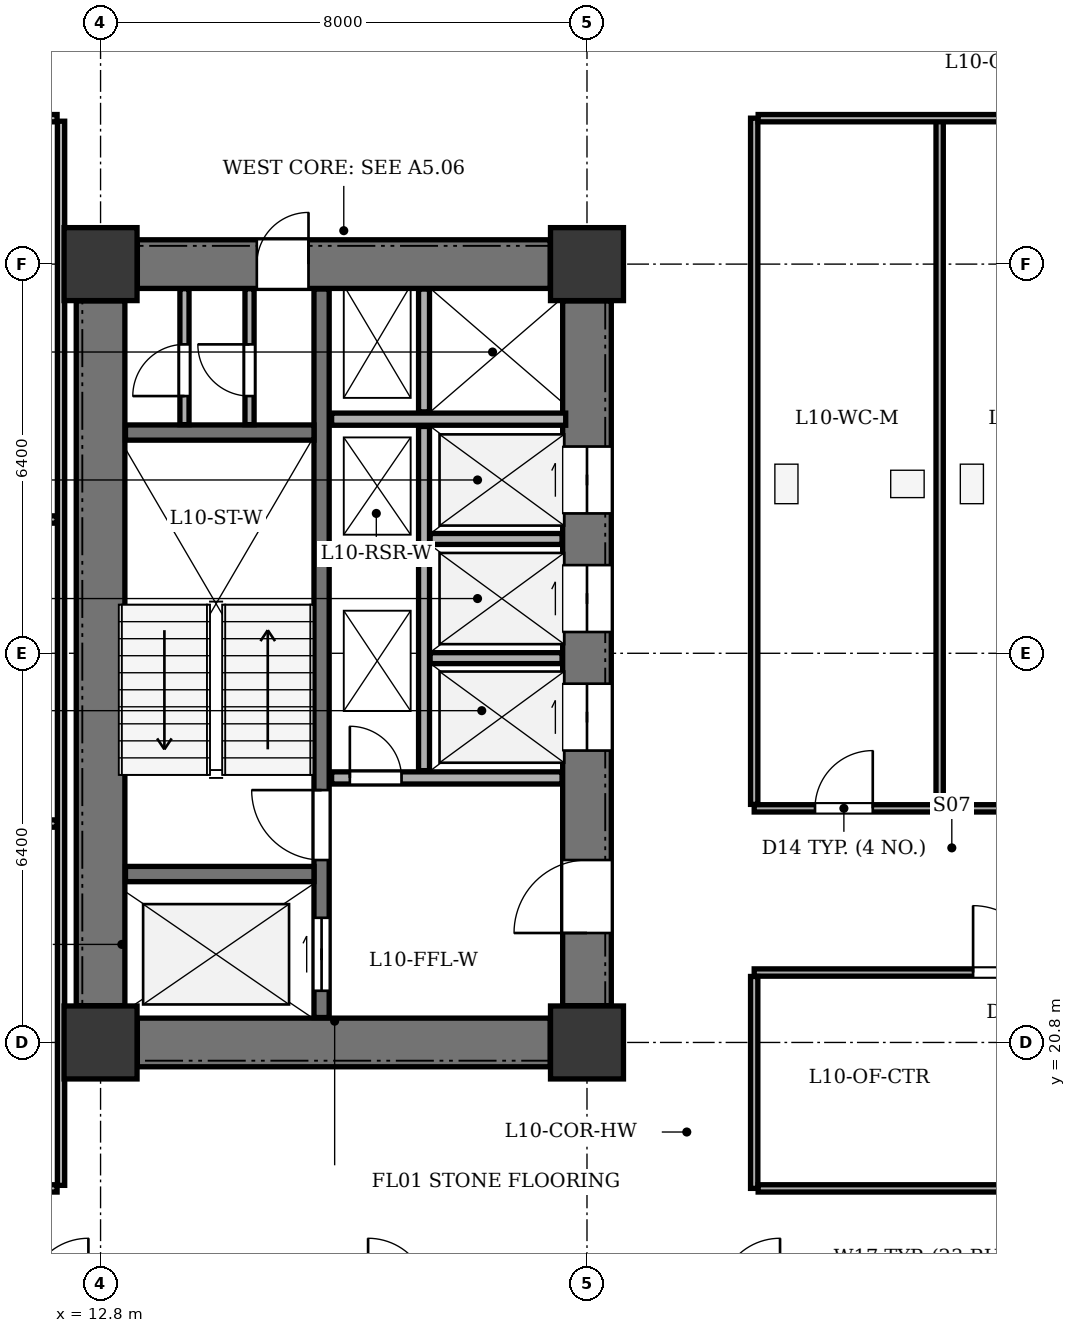
"""IFC4 building model, lengths in metres.
Left out: names, types, materials, properties, quantities, classifications, styles, units other than length and angle.
Written with IfcOpenShell. Run it as: python <this file> out.ifc"""

import sys

from ifc_helpers import new_model, si_unit, direction, frame, frame_2d, origin, origin_2d, place, context, subcontext, project, spatial, rectangle, extrude, element, fill, save


model = new_model("IFC4")
c1 = context("Model", 3, precision=1e-05, world=origin(), true_north=direction((0.0, 1.0)))
c2 = subcontext(c1, "Body", "Model", "MODEL_VIEW")
j1 = project(units=[si_unit("LENGTHUNIT", "METRE"), si_unit("PLANEANGLEUNIT", "RADIAN")], contexts=[c1])
p1 = place(None, origin())
s1 = spatial("IfcSite", under=j1, at=p1, CompositionType="ELEMENT")
p2 = place(p1, origin())
s2 = spatial("IfcBuilding", under=s1, at=p2, CompositionType="ELEMENT")
p3 = place(p2, frame((0.0, 0.0, 43.8)))
s3 = spatial("IfcBuildingStorey", under=s2, at=p3, CompositionType="ELEMENT", Elevation=43.8)
for number, where, z_axis, x_axis in (
    (1, (12.8, 20.8, 0.0), (0.0, 0.0, 1.0), (1.0, 0.0, 0.0)),
    (2, (20.8, 20.8, 0.0), (0.0, 0.0, 1.0), (1.0, 0.0, 0.0)),
    (3, (12.8, 33.6, 0.0), (0.0, 0.0, 1.0), (1.0, 0.0, 0.0)),
    (4, (20.8, 33.6, 0.0), (0.0, 0.0, 1.0), (1.0, 0.0, 0.0)),
):
    element("IfcColumn", number, at=place(p3, frame(where, z_axis=z_axis, x_axis=x_axis)), inside=s3, PredefinedType="COLUMN", context=c2, shape_type="SweptSolid", body=[
        extrude(rectangle(XDim=1.2, YDim=1.2, at=origin_2d()), origin(), (0.0, 0.0, 1.0), 3.9),
    ])
p4 = place(p3, frame((12.8, 21.405, 0.0), z_axis=(0.0, 0.0, 1.0), x_axis=(0.0, 1.0, 0.0)))
e5 = element("IfcWall", 5, at=p4, inside=s3, PredefinedType="SHEAR", context=c2, shape_type="SweptSolid", body=[
    extrude(rectangle(XDim=11.59, YDim=0.8, at=frame_2d((5.795, 0.0))), origin(), (0.0, 0.0, 1.0), 3.45),
])
p5 = place(p3, frame((13.405, 20.8, 0.0), z_axis=(0.0, 0.0, 1.0), x_axis=(1.0, 0.0, 0.0)))
e6 = element("IfcWall", 6, at=p5, inside=s3, PredefinedType="SHEAR", context=c2, shape_type="SweptSolid", body=[
    extrude(rectangle(XDim=6.79, YDim=0.8, at=frame_2d((3.395, 0.0))), origin(), (0.0, 0.0, 1.0), 3.45),
])
p6 = place(p3, frame((13.405, 33.6, 0.0), z_axis=(0.0, 0.0, 1.0), x_axis=(1.0, 0.0, 0.0)))
e7 = element("IfcWall", 7, at=p6, inside=s3, PredefinedType="SHEAR", context=c2, shape_type="SweptSolid", body=[
    extrude(rectangle(XDim=6.79, YDim=0.8, at=frame_2d((3.395, 0.0))), origin(), (0.0, 0.0, 1.0), 3.45),
])
p7 = place(p6, frame((1.965, 0.0, 0.0)))
e8 = element("IfcOpeningElement", 8, at=p7, cuts=e7, PredefinedType="OPENING", context=c2, shape_type="SweptSolid", body=[
    extrude(rectangle(XDim=0.85, YDim=2.02, at=frame_2d((0.425, 1.01))), frame((0.0, 0.41, 0.0), z_axis=(0.0, -1.0, 0.0), x_axis=(1.0, 0.0, 0.0)), (0.0, 0.0, 1.0), 0.82),
])
p8 = place(p3, frame((20.8, 21.405, 0.0), z_axis=(0.0, 0.0, 1.0), x_axis=(0.0, 1.0, 0.0)))
e9 = element("IfcWall", 9, at=p8, inside=s3, PredefinedType="SHEAR", context=c2, shape_type="SweptSolid", body=[
    extrude(rectangle(XDim=11.59, YDim=0.8, at=frame_2d((5.795, 0.0))), origin(), (0.0, 0.0, 1.0), 3.45),
])
p9 = place(p8, frame((1.195, 0.0, 0.0)))
e10 = element("IfcOpeningElement", 10, at=p9, cuts=e9, PredefinedType="OPENING", context=c2, shape_type="SweptSolid", body=[
    extrude(rectangle(XDim=1.2, YDim=2.15, at=frame_2d((0.6, 1.075))), frame((0.0, 0.41, 0.0), z_axis=(0.0, -1.0, 0.0), x_axis=(1.0, 0.0, 0.0)), (0.0, 0.0, 1.0), 0.82),
])
p10 = place(p8, frame((4.195, 0.0, 0.0)))
e11 = element("IfcOpeningElement", 11, at=p10, cuts=e9, PredefinedType="OPENING", context=c2, shape_type="SweptSolid", body=[
    extrude(rectangle(XDim=1.1, YDim=2.1, at=frame_2d((0.55, 1.05))), frame((0.0, 0.41, 0.0), z_axis=(0.0, -1.0, 0.0), x_axis=(1.0, 0.0, 0.0)), (0.0, 0.0, 1.0), 0.82),
])
p11 = place(p8, frame((6.145, 0.0, 0.0)))
e12 = element("IfcOpeningElement", 12, at=p11, cuts=e9, PredefinedType="OPENING", context=c2, shape_type="SweptSolid", body=[
    extrude(rectangle(XDim=1.1, YDim=2.1, at=frame_2d((0.55, 1.05))), frame((0.0, 0.41, 0.0), z_axis=(0.0, -1.0, 0.0), x_axis=(1.0, 0.0, 0.0)), (0.0, 0.0, 1.0), 0.82),
])
p12 = place(p8, frame((8.095, 0.0, 0.0)))
e13 = element("IfcOpeningElement", 13, at=p12, cuts=e9, PredefinedType="OPENING", context=c2, shape_type="SweptSolid", body=[
    extrude(rectangle(XDim=1.1, YDim=2.1, at=frame_2d((0.55, 1.05))), frame((0.0, 0.41, 0.0), z_axis=(0.0, -1.0, 0.0), x_axis=(1.0, 0.0, 0.0)), (0.0, 0.0, 1.0), 0.82),
])
p13 = place(p3, frame((16.435, 21.21, 0.0), z_axis=(0.0, 0.0, 1.0), x_axis=(0.0, 1.0, 0.0)))
e14 = element("IfcWall", 14, at=p13, inside=s3, PredefinedType="SHEAR", context=c2, shape_type="SweptSolid", body=[
    extrude(rectangle(XDim=11.98, YDim=0.25, at=frame_2d((5.99, 0.0))), origin(), (0.0, 0.0, 1.0), 3.45),
])
p14 = place(p13, frame((0.44, 0.0, 0.0)))
e15 = element("IfcOpeningElement", 15, at=p14, cuts=e14, PredefinedType="OPENING", context=c2, shape_type="SweptSolid", body=[
    extrude(rectangle(XDim=1.2, YDim=2.15, at=frame_2d((0.6, 1.075))), frame((0.0, 0.135, 0.0), z_axis=(0.0, -1.0, 0.0), x_axis=(1.0, 0.0, 0.0)), (0.0, 0.0, 1.0), 0.27),
])
p15 = place(p13, frame((2.59, 0.0, 0.0)))
e16 = element("IfcOpeningElement", 16, at=p15, cuts=e14, PredefinedType="OPENING", context=c2, shape_type="SweptSolid", body=[
    extrude(rectangle(XDim=1.15, YDim=2.15, at=frame_2d((0.575, 1.075))), frame((0.0, 0.135, 0.0), z_axis=(0.0, -1.0, 0.0), x_axis=(1.0, 0.0, 0.0)), (0.0, 0.0, 1.0), 0.27),
])
for number, where, z_axis, x_axis in (
    (17, (13.21, 23.57, 0.0), (0.0, 0.0, 1.0), (1.0, 0.0, 0.0)),
    (18, (13.21, 30.83, 0.0), (0.0, 0.0, 1.0), (1.0, 0.0, 0.0)),
):
    element("IfcWall", number, at=place(p3, frame(where, z_axis=z_axis, x_axis=x_axis)), inside=s3, PredefinedType="SHEAR", context=c2, shape_type="SweptSolid", body=[
        extrude(rectangle(XDim=3.1, YDim=0.25, at=frame_2d((1.55, 0.0))), origin(), (0.0, 0.0, 1.0), 3.45),
    ])
p16 = place(p3, frame((16.6, 25.15, 0.0), z_axis=(0.0, 0.0, 1.0), x_axis=(1.0, 0.0, 0.0)))
e19 = element("IfcWall", 19, at=p16, inside=s3, PredefinedType="SOLIDWALL", context=c2, shape_type="SweptSolid", body=[
    extrude(rectangle(XDim=3.79, YDim=0.2, at=frame_2d((1.895, 0.0))), origin(), (0.0, 0.0, 1.0), 3.45),
])
p17 = place(p16, frame((0.3, 0.0, 0.0)))
e20 = element("IfcOpeningElement", 20, at=p17, cuts=e19, PredefinedType="OPENING", context=c2, shape_type="SweptSolid", body=[
    extrude(rectangle(XDim=0.85, YDim=2.02, at=frame_2d((0.425, 1.01))), frame((0.0, 0.11, 0.0), z_axis=(0.0, -1.0, 0.0), x_axis=(1.0, 0.0, 0.0)), (0.0, 0.0, 1.0), 0.22),
])
p18 = place(p3, frame((16.6, 31.05, 0.0), z_axis=(0.0, 0.0, 1.0), x_axis=(1.0, 0.0, 0.0)))
e21 = element("IfcWall", 21, at=p18, inside=s3, PredefinedType="SOLIDWALL", context=c2, shape_type="SweptSolid", body=[
    extrude(rectangle(XDim=3.85, YDim=0.2, at=frame_2d((1.925, 0.0))), origin(), (0.0, 0.0, 1.0), 3.45),
])
p19 = place(p3, frame((18.12, 25.27, 0.0), z_axis=(0.0, 0.0, 1.0), x_axis=(0.0, 1.0, 0.0)))
e22 = element("IfcWall", 22, at=p19, inside=s3, PredefinedType="PARTITIONING", context=c2, shape_type="SweptSolid", body=[
    extrude(rectangle(XDim=5.66, YDim=0.18, at=frame_2d((2.83, 0.0))), origin(), (0.0, 0.0, 1.0), 3.45),
])
p20 = place(p3, frame((18.12, 31.17, 0.0), z_axis=(0.0, 0.0, 1.0), x_axis=(0.0, 1.0, 0.0)))
e23 = element("IfcWall", 23, at=p20, inside=s3, PredefinedType="PARTITIONING", context=c2, shape_type="SweptSolid", body=[
    extrude(rectangle(XDim=2.02, YDim=0.18, at=frame_2d((1.01, 0.0))), origin(), (0.0, 0.0, 1.0), 3.45),
])
for number, where, z_axis, x_axis in (
    (24, (18.22, 27.12, 0.0), (0.0, 0.0, 1.0), (1.0, 0.0, 0.0)),
    (25, (18.22, 29.08, 0.0), (0.0, 0.0, 1.0), (1.0, 0.0, 0.0)),
):
    element("IfcWall", number, at=place(p3, frame(where, z_axis=z_axis, x_axis=x_axis)), inside=s3, PredefinedType="PARTITIONING", context=c2, shape_type="SweptSolid", body=[
        extrude(rectangle(XDim=2.17, YDim=0.18, at=frame_2d((1.085, 0.0))), origin(), (0.0, 0.0, 1.0), 3.45),
    ])
p21 = place(p3, frame((14.18, 30.96, 0.0), z_axis=(0.0, 0.0, 1.0), x_axis=(0.0, 1.0, 0.0)))
e26 = element("IfcWall", 26, at=p21, inside=s3, PredefinedType="PARTITIONING", context=c2, shape_type="SweptSolid", body=[
    extrude(rectangle(XDim=2.235, YDim=0.15, at=frame_2d((1.118, 0.0))), origin(), (0.0, 0.0, 1.0), 3.45),
])
p22 = place(p21, frame((0.47, 0.0, 0.0)))
e27 = element("IfcOpeningElement", 27, at=p22, cuts=e26, PredefinedType="OPENING", context=c2, shape_type="SweptSolid", body=[
    extrude(rectangle(XDim=0.85, YDim=2.02, at=frame_2d((0.425, 1.01))), frame((0.0, 0.085, 0.0), z_axis=(0.0, -1.0, 0.0), x_axis=(1.0, 0.0, 0.0)), (0.0, 0.0, 1.0), 0.17),
])
p23 = place(p3, frame((15.25, 30.96, 0.0), z_axis=(0.0, 0.0, 1.0), x_axis=(0.0, 1.0, 0.0)))
e28 = element("IfcWall", 28, at=p23, inside=s3, PredefinedType="PARTITIONING", context=c2, shape_type="SweptSolid", body=[
    extrude(rectangle(XDim=2.235, YDim=0.15, at=frame_2d((1.118, 0.0))), origin(), (0.0, 0.0, 1.0), 3.45),
])
p24 = place(p23, frame((0.47, 0.0, 0.0)))
e29 = element("IfcOpeningElement", 29, at=p24, cuts=e28, PredefinedType="OPENING", context=c2, shape_type="SweptSolid", body=[
    extrude(rectangle(XDim=0.85, YDim=2.02, at=frame_2d((0.425, 1.01))), frame((0.0, 0.085, 0.0), z_axis=(0.0, -1.0, 0.0), x_axis=(1.0, 0.0, 0.0)), (0.0, 0.0, 1.0), 0.17),
])
p25 = place(p3, frame((23.55, 24.65, 0.0), z_axis=(0.0, 0.0, 1.0), x_axis=(1.0, 0.0, 0.0)))
e30 = element("IfcWall", 30, at=p25, inside=s3, PredefinedType="PARTITIONING", context=c2, shape_type="SweptSolid", body=[
    extrude(rectangle(XDim=8.9, YDim=0.12, at=frame_2d((4.45, 0.0))), origin(), (0.0, 0.0, 1.0), 2.885),
])
p26 = place(p25, frame((1.0, 0.0, 0.0)))
e31 = element("IfcOpeningElement", 31, at=p26, cuts=e30, PredefinedType="OPENING", context=c2, shape_type="SweptSolid", body=[
    extrude(rectangle(XDim=0.95, YDim=2.1, at=frame_2d((0.475, 1.05))), frame((0.0, 0.07, 0.0), z_axis=(0.0, -1.0, 0.0), x_axis=(1.0, 0.0, 0.0)), (0.0, 0.0, 1.0), 0.14),
])
p27 = place(p25, frame((4.1, 0.0, 0.0)))
e32 = element("IfcOpeningElement", 32, at=p27, cuts=e30, PredefinedType="OPENING", context=c2, shape_type="SweptSolid", body=[
    extrude(rectangle(XDim=0.95, YDim=2.1, at=frame_2d((0.475, 1.05))), frame((0.0, 0.07, 0.0), z_axis=(0.0, -1.0, 0.0), x_axis=(1.0, 0.0, 0.0)), (0.0, 0.0, 1.0), 0.14),
])
p28 = place(p25, frame((7.0, 0.0, 0.0)))
e33 = element("IfcOpeningElement", 33, at=p28, cuts=e30, PredefinedType="OPENING", context=c2, shape_type="SweptSolid", body=[
    extrude(rectangle(XDim=1.0, YDim=2.1, at=frame_2d((0.5, 1.05))), frame((0.0, 0.07, 0.0), z_axis=(0.0, -1.0, 0.0), x_axis=(1.0, 0.0, 0.0)), (0.0, 0.0, 1.0), 0.14),
])
for number, where, z_axis, x_axis in (
    (34, (23.55, 24.715, 0.0), (0.0, 0.0, 1.0), (0.0, 1.0, 0.0)),
    (35, (26.6, 24.715, 0.0), (0.0, 0.0, 1.0), (0.0, 1.0, 0.0)),
):
    element("IfcWall", number, at=place(p3, frame(where, z_axis=z_axis, x_axis=x_axis)), inside=s3, PredefinedType="PARTITIONING", context=c2, shape_type="SweptSolid", body=[
        extrude(rectangle(XDim=11.285, YDim=0.12, at=frame_2d((5.643, 0.0))), origin(), (0.0, 0.0, 1.0), 3.45),
    ])
p29 = place(p3, frame((23.615, 36.0, 0.0), z_axis=(0.0, 0.0, 1.0), x_axis=(1.0, 0.0, 0.0)))
e36 = element("IfcWall", 36, at=p29, inside=s3, PredefinedType="PARTITIONING", context=c2, shape_type="SweptSolid", body=[
    extrude(rectangle(XDim=8.77, YDim=0.12, at=frame_2d((4.385, 0.0))), origin(), (0.0, 0.0, 1.0), 3.45),
])
p30 = place(p3, frame((23.55, 21.95, 0.0), z_axis=(0.0, 0.0, 1.0), x_axis=(1.0, 0.0, 0.0)))
e37 = element("IfcWall", 37, at=p30, inside=s3, PredefinedType="PARTITIONING", context=c2, shape_type="SweptSolid", body=[
    extrude(rectangle(XDim=8.9, YDim=0.12, at=frame_2d((4.45, 0.0))), origin(), (0.0, 0.0, 1.0), 2.885),
])
p31 = place(p30, frame((3.6, 0.0, 0.0)))
e38 = element("IfcOpeningElement", 38, at=p31, cuts=e37, PredefinedType="OPENING", context=c2, shape_type="SweptSolid", body=[
    extrude(rectangle(XDim=1.1, YDim=2.15, at=frame_2d((0.55, 1.075))), frame((0.0, 0.07, 0.0), z_axis=(0.0, -1.0, 0.0), x_axis=(1.0, 0.0, 0.0)), (0.0, 0.0, 1.0), 0.14),
])
p32 = place(p3, frame((23.55, 18.4, 0.0), z_axis=(0.0, 0.0, 1.0), x_axis=(0.0, 1.0, 0.0)))
e39 = element("IfcWall", 39, at=p32, inside=s3, PredefinedType="PARTITIONING", context=c2, shape_type="SweptSolid", body=[
    extrude(rectangle(XDim=3.485, YDim=0.12, at=frame_2d((1.743, 0.0))), origin(), (0.0, 0.0, 1.0), 3.45),
])
p33 = place(p3, frame((23.615, 18.4, 0.0), z_axis=(0.0, 0.0, 1.0), x_axis=(1.0, 0.0, 0.0)))
e40 = element("IfcWall", 40, at=p33, inside=s3, PredefinedType="PARTITIONING", context=c2, shape_type="SweptSolid", body=[
    extrude(rectangle(XDim=8.77, YDim=0.12, at=frame_2d((4.385, 0.0))), origin(), (0.0, 0.0, 1.0), 3.45),
])
p34 = place(p3, frame((12.15, 18.45, 0.0), z_axis=(0.0, 0.0, 1.0), x_axis=(0.0, 1.0, 0.0)))
e41 = element("IfcWall", 41, at=p34, inside=s3, PredefinedType="PARTITIONING", context=c2, shape_type="SweptSolid", body=[
    extrude(rectangle(XDim=17.5, YDim=0.12, at=frame_2d((8.75, 0.0))), origin(), (0.0, 0.0, 1.0), 3.45),
])
p35 = place(p3, frame((4.705, 18.4, 0.0), z_axis=(0.0, 0.0, 1.0), x_axis=(1.0, 0.0, 0.0)))
e42 = element("IfcWall", 42, at=p35, inside=s3, PredefinedType="PARTITIONING", context=c2, shape_type="SweptSolid", body=[
    extrude(rectangle(XDim=7.38, YDim=0.12, at=frame_2d((3.69, 0.0))), origin(), (0.0, 0.0, 1.0), 3.45),
])
p36 = place(p35, frame((5.18, 0.0, 0.0)))
e43 = element("IfcOpeningElement", 43, at=p36, cuts=e42, PredefinedType="OPENING", context=c2, shape_type="SweptSolid", body=[
    extrude(rectangle(XDim=0.95, YDim=2.1, at=frame_2d((0.475, 1.05))), frame((0.0, 0.07, 0.0), z_axis=(0.0, -1.0, 0.0), x_axis=(1.0, 0.0, 0.0)), (0.0, 0.0, 1.0), 0.14),
])
p37 = place(p3, frame((4.705, 36.0, 0.0), z_axis=(0.0, 0.0, 1.0), x_axis=(1.0, 0.0, 0.0)))
e44 = element("IfcWall", 44, at=p37, inside=s3, PredefinedType="PARTITIONING", context=c2, shape_type="SweptSolid", body=[
    extrude(rectangle(XDim=7.38, YDim=0.12, at=frame_2d((3.69, 0.0))), origin(), (0.0, 0.0, 1.0), 3.45),
])
p38 = place(p37, frame((5.18, 0.0, 0.0)))
e45 = element("IfcOpeningElement", 45, at=p38, cuts=e44, PredefinedType="OPENING", context=c2, shape_type="SweptSolid", body=[
    extrude(rectangle(XDim=0.95, YDim=2.1, at=frame_2d((0.475, 1.05))), frame((0.0, 0.07, 0.0), z_axis=(0.0, -1.0, 0.0), x_axis=(1.0, 0.0, 0.0)), (0.0, 0.0, 1.0), 0.14),
])
p39 = place(p3, frame((4.705, 24.4, 0.0), z_axis=(0.0, 0.0, 1.0), x_axis=(1.0, 0.0, 0.0)))
e46 = element("IfcWall", 46, at=p39, inside=s3, PredefinedType="PARTITIONING", context=c2, shape_type="SweptSolid", body=[
    extrude(rectangle(XDim=7.38, YDim=0.12, at=frame_2d((3.69, 0.0))), origin(), (0.0, 0.0, 1.0), 3.45),
])
p40 = place(p39, frame((2.0, 0.0, 0.0)))
e47 = element("IfcOpeningElement", 47, at=p40, cuts=e46, PredefinedType="OPENING", context=c2, shape_type="SweptSolid", body=[
    extrude(rectangle(XDim=0.9, YDim=2.05, at=frame_2d((0.45, 1.025))), frame((0.0, 0.07, 0.0), z_axis=(0.0, -1.0, 0.0), x_axis=(1.0, 0.0, 0.0)), (0.0, 0.0, 1.0), 0.14),
])
p41 = place(p3, frame((4.705, 29.4, 0.0), z_axis=(0.0, 0.0, 1.0), x_axis=(1.0, 0.0, 0.0)))
e48 = element("IfcWall", 48, at=p41, inside=s3, PredefinedType="PARTITIONING", context=c2, shape_type="SweptSolid", body=[
    extrude(rectangle(XDim=7.38, YDim=0.12, at=frame_2d((3.69, 0.0))), origin(), (0.0, 0.0, 1.0), 2.885),
])
p42 = place(p41, frame((2.0, 0.0, 0.0)))
e49 = element("IfcOpeningElement", 49, at=p42, cuts=e48, PredefinedType="OPENING", context=c2, shape_type="SweptSolid", body=[
    extrude(rectangle(XDim=0.9, YDim=2.05, at=frame_2d((0.45, 1.025))), frame((0.0, 0.07, 0.0), z_axis=(0.0, -1.0, 0.0), x_axis=(1.0, 0.0, 0.0)), (0.0, 0.0, 1.0), 0.14),
])
p43 = place(p7, origin())
e50 = element("IfcDoor", 50, at=p43, inside=s3, OperationType="SINGLE_SWING_RIGHT", PredefinedType="DOOR", context=c2, shape_type="SweptSolid", body=[
    extrude(rectangle(XDim=0.85, YDim=2.02, at=frame_2d((0.425, 1.01))), frame((0.0, 0.025, 0.0), z_axis=(0.0, -1.0, 0.0), x_axis=(1.0, 0.0, 0.0)), (0.0, 0.0, 1.0), 0.05),
])
fill(e8, e50)
p44 = place(p9, origin())
e51 = element("IfcDoor", 51, at=p44, inside=s3, OperationType="SINGLE_SWING_LEFT", PredefinedType="DOOR", context=c2, shape_type="SweptSolid", body=[
    extrude(rectangle(XDim=1.2, YDim=2.15, at=frame_2d((0.6, 1.075))), frame((0.0, 0.025, 0.0), z_axis=(0.0, -1.0, 0.0), x_axis=(1.0, 0.0, 0.0)), (0.0, 0.0, 1.0), 0.05),
])
fill(e10, e51)
p45 = place(p10, origin())
e52 = element("IfcDoor", 52, at=p45, inside=s3, OperationType="DOUBLE_DOOR_SLIDING", PredefinedType="DOOR", context=c2, shape_type="SweptSolid", body=[
    extrude(rectangle(XDim=1.1, YDim=2.1, at=frame_2d((0.55, 1.05))), frame((0.0, 0.025, 0.0), z_axis=(0.0, -1.0, 0.0), x_axis=(1.0, 0.0, 0.0)), (0.0, 0.0, 1.0), 0.05),
])
fill(e11, e52)
p46 = place(p11, origin())
e53 = element("IfcDoor", 53, at=p46, inside=s3, OperationType="DOUBLE_DOOR_SLIDING", PredefinedType="DOOR", context=c2, shape_type="SweptSolid", body=[
    extrude(rectangle(XDim=1.1, YDim=2.1, at=frame_2d((0.55, 1.05))), frame((0.0, 0.025, 0.0), z_axis=(0.0, -1.0, 0.0), x_axis=(1.0, 0.0, 0.0)), (0.0, 0.0, 1.0), 0.05),
])
fill(e12, e53)
p47 = place(p12, origin())
e54 = element("IfcDoor", 54, at=p47, inside=s3, OperationType="DOUBLE_DOOR_SLIDING", PredefinedType="DOOR", context=c2, shape_type="SweptSolid", body=[
    extrude(rectangle(XDim=1.1, YDim=2.1, at=frame_2d((0.55, 1.05))), frame((0.0, 0.025, 0.0), z_axis=(0.0, -1.0, 0.0), x_axis=(1.0, 0.0, 0.0)), (0.0, 0.0, 1.0), 0.05),
])
fill(e13, e54)
p48 = place(p14, origin())
e55 = element("IfcDoor", 55, at=p48, inside=s3, OperationType="DOUBLE_DOOR_SLIDING", PredefinedType="DOOR", context=c2, shape_type="SweptSolid", body=[
    extrude(rectangle(XDim=1.2, YDim=2.15, at=frame_2d((0.6, 1.075))), frame((0.0, 0.025, 0.0), z_axis=(0.0, -1.0, 0.0), x_axis=(1.0, 0.0, 0.0)), (0.0, 0.0, 1.0), 0.05),
])
fill(e15, e55)
p49 = place(p15, origin())
e56 = element("IfcDoor", 56, at=p49, inside=s3, OperationType="SINGLE_SWING_RIGHT", PredefinedType="DOOR", context=c2, shape_type="SweptSolid", body=[
    extrude(rectangle(XDim=1.15, YDim=2.15, at=frame_2d((0.575, 1.075))), frame((0.0, 0.025, 0.0), z_axis=(0.0, -1.0, 0.0), x_axis=(1.0, 0.0, 0.0)), (0.0, 0.0, 1.0), 0.05),
])
fill(e16, e56)
p50 = place(p17, origin())
e57 = element("IfcDoor", 57, at=p50, inside=s3, OperationType="SINGLE_SWING_LEFT", PredefinedType="DOOR", context=c2, shape_type="SweptSolid", body=[
    extrude(rectangle(XDim=0.85, YDim=2.02, at=frame_2d((0.425, 1.01))), frame((0.0, 0.025, 0.0), z_axis=(0.0, -1.0, 0.0), x_axis=(1.0, 0.0, 0.0)), (0.0, 0.0, 1.0), 0.05),
])
fill(e20, e57)
p51 = place(p22, origin())
e58 = element("IfcDoor", 58, at=p51, inside=s3, OperationType="SINGLE_SWING_LEFT", PredefinedType="DOOR", context=c2, shape_type="SweptSolid", body=[
    extrude(rectangle(XDim=0.85, YDim=2.02, at=frame_2d((0.425, 1.01))), frame((0.0, 0.025, 0.0), z_axis=(0.0, -1.0, 0.0), x_axis=(1.0, 0.0, 0.0)), (0.0, 0.0, 1.0), 0.05),
])
fill(e27, e58)
p52 = place(p24, origin())
e59 = element("IfcDoor", 59, at=p52, inside=s3, OperationType="SINGLE_SWING_RIGHT", PredefinedType="DOOR", context=c2, shape_type="SweptSolid", body=[
    extrude(rectangle(XDim=0.85, YDim=2.02, at=frame_2d((0.425, 1.01))), frame((0.0, 0.025, 0.0), z_axis=(0.0, -1.0, 0.0), x_axis=(1.0, 0.0, 0.0)), (0.0, 0.0, 1.0), 0.05),
])
fill(e29, e59)
p53 = place(p26, origin())
e60 = element("IfcDoor", 60, at=p53, inside=s3, OperationType="SINGLE_SWING_RIGHT", PredefinedType="DOOR", context=c2, shape_type="SweptSolid", body=[
    extrude(rectangle(XDim=0.95, YDim=2.1, at=frame_2d((0.475, 1.05))), frame((0.0, 0.025, 0.0), z_axis=(0.0, -1.0, 0.0), x_axis=(1.0, 0.0, 0.0)), (0.0, 0.0, 1.0), 0.05),
])
fill(e31, e60)
p54 = place(p31, origin())
e61 = element("IfcDoor", 61, at=p54, inside=s3, OperationType="SINGLE_SWING_LEFT", PredefinedType="DOOR", context=c2, shape_type="SweptSolid", body=[
    extrude(rectangle(XDim=1.1, YDim=2.15, at=frame_2d((0.55, 1.075))), frame((0.0, 0.025, 0.0), z_axis=(0.0, -1.0, 0.0), x_axis=(1.0, 0.0, 0.0)), (0.0, 0.0, 1.0), 0.05),
])
fill(e38, e61)
save(model, sys.argv[1])
